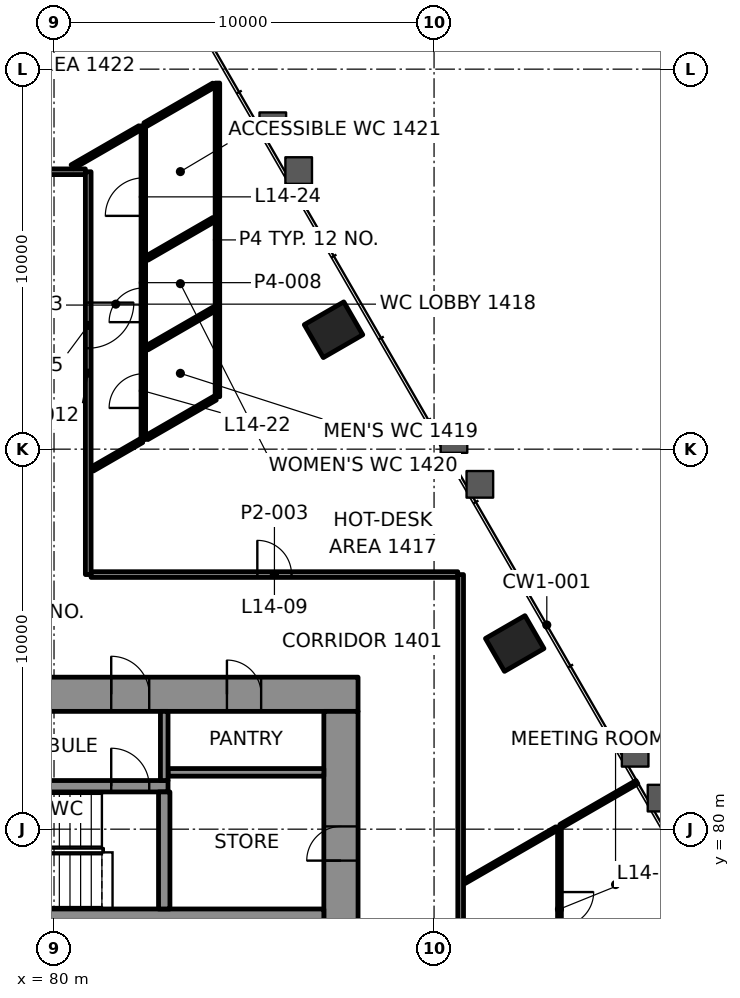
"""IFC4 building model, lengths in metres.
Left out: names, types, materials, properties, quantities, classifications, styles, units other than length and angle.
Written with IfcOpenShell. Run it as: python <this file> out.ifc"""

import sys

from ifc_helpers import new_model, si_unit, direction, frame, frame_2d, origin, origin_2d, place, context, subcontext, project, spatial, rectangle, extrude, element, fill, save


model = new_model("IFC4")
c1 = context("Model", 3, precision=1e-05, world=origin(), true_north=direction((0.0, 1.0)))
c2 = subcontext(c1, "Body", "Model", "MODEL_VIEW")
j1 = project(units=[si_unit("LENGTHUNIT", "METRE"), si_unit("PLANEANGLEUNIT", "RADIAN")], contexts=[c1])
p1 = place(None, origin())
s1 = spatial("IfcSite", under=j1, at=p1, CompositionType="ELEMENT")
p2 = place(p1, origin())
s2 = spatial("IfcBuilding", under=s1, at=p2, CompositionType="ELEMENT")
p3 = place(p2, frame((0.0, 0.0, 65.2)))
s3 = spatial("IfcBuildingStorey", under=s2, at=p3, CompositionType="ELEMENT", Elevation=65.2)
for number, where, z_axis, x_axis in (
    (1, (92.122, 84.885, -0.0), (0.0, 0.0, 1.0), (-0.5, 0.866, 0.0)),
    (2, (87.355, 93.143, -0.0), (0.0, 0.0, 1.0), (-0.5, 0.866, 0.0)),
):
    element("IfcColumn", number, at=place(p3, frame(where, z_axis=z_axis, x_axis=x_axis)), inside=s3, PredefinedType="COLUMN", context=c2, shape_type="SweptSolid", body=[
        extrude(rectangle(XDim=1.0, YDim=1.2, at=origin_2d()), origin(), (0.0, 0.0, 1.0), 4.2),
    ])
p4 = place(p3, frame((62.0, 83.55, 0.0), z_axis=(0.0, 0.0, 1.0), x_axis=(1.0, 0.0, 0.0)))
e3 = element("IfcWall", 3, at=p4, inside=s3, PredefinedType="SHEAR", context=c2, shape_type="SweptSolid", body=[
    extrude(rectangle(XDim=26.0, YDim=0.9, at=frame_2d((13.0, 0.0))), origin(), (0.0, 0.0, 1.0), 4.0),
])
p5 = place(p4, frame((5.695, 0.0, 0.0)))
e4 = element("IfcOpeningElement", 4, at=p5, cuts=e3, PredefinedType="OPENING", context=c2, shape_type="SweptSolid", body=[
    extrude(rectangle(XDim=1.0, YDim=2.1, at=frame_2d((0.5, 1.05))), frame((0.0, 0.46, 0.0), z_axis=(0.0, -1.0, 0.0), x_axis=(1.0, 0.0, 0.0)), (0.0, 0.0, 1.0), 0.92),
])
p6 = place(p4, frame((19.505, 0.0, 0.0)))
e5 = element("IfcOpeningElement", 5, at=p6, cuts=e3, PredefinedType="OPENING", context=c2, shape_type="SweptSolid", body=[
    extrude(rectangle(XDim=1.0, YDim=2.1, at=frame_2d((0.5, 1.05))), frame((0.0, 0.46, 0.0), z_axis=(0.0, -1.0, 0.0), x_axis=(1.0, 0.0, 0.0)), (0.0, 0.0, 1.0), 0.92),
])
p7 = place(p4, frame((3.45, 0.0, 0.0)))
e6 = element("IfcOpeningElement", 6, at=p7, cuts=e3, PredefinedType="OPENING", context=c2, shape_type="SweptSolid", body=[
    extrude(rectangle(XDim=0.9, YDim=2.1, at=frame_2d((0.45, 1.05))), frame((0.0, 0.46, 0.0), z_axis=(0.0, -1.0, 0.0), x_axis=(1.0, 0.0, 0.0)), (0.0, 0.0, 1.0), 0.92),
])
p8 = place(p4, frame((12.65, 0.0, 0.0)))
e7 = element("IfcOpeningElement", 7, at=p8, cuts=e3, PredefinedType="OPENING", context=c2, shape_type="SweptSolid", body=[
    extrude(rectangle(XDim=0.9, YDim=2.1, at=frame_2d((0.45, 1.05))), frame((0.0, 0.46, 0.0), z_axis=(0.0, -1.0, 0.0), x_axis=(1.0, 0.0, 0.0)), (0.0, 0.0, 1.0), 0.92),
])
p9 = place(p4, frame((22.55, 0.0, 0.0)))
e8 = element("IfcOpeningElement", 8, at=p9, cuts=e3, PredefinedType="OPENING", context=c2, shape_type="SweptSolid", body=[
    extrude(rectangle(XDim=0.9, YDim=2.1, at=frame_2d((0.45, 1.05))), frame((0.0, 0.46, 0.0), z_axis=(0.0, -1.0, 0.0), x_axis=(1.0, 0.0, 0.0)), (0.0, 0.0, 1.0), 0.92),
])
p10 = place(p3, frame((87.55, 66.9, 0.0), z_axis=(0.0, 0.0, 1.0), x_axis=(0.0, 1.0, 0.0)))
e9 = element("IfcWall", 9, at=p10, inside=s3, PredefinedType="SHEAR", context=c2, shape_type="SweptSolid", body=[
    extrude(rectangle(XDim=16.2, YDim=0.9, at=frame_2d((8.1, 0.0))), origin(), (0.0, 0.0, 1.0), 4.0),
])
p11 = place(p10, frame((5.5, 0.0, 0.0)))
e10 = element("IfcOpeningElement", 10, at=p11, cuts=e9, PredefinedType="OPENING", context=c2, shape_type="SweptSolid", body=[
    extrude(rectangle(XDim=1.8, YDim=2.1, at=frame_2d((0.9, 1.05))), frame((0.0, 0.46, 0.0), z_axis=(0.0, -1.0, 0.0), x_axis=(1.0, 0.0, 0.0)), (0.0, 0.0, 1.0), 0.92),
])
p12 = place(p10, frame((12.272, 0.0, 0.0)))
e11 = element("IfcOpeningElement", 11, at=p12, cuts=e9, PredefinedType="OPENING", context=c2, shape_type="SweptSolid", body=[
    extrude(rectangle(XDim=0.9, YDim=2.1, at=frame_2d((0.45, 1.05))), frame((0.0, 0.46, 0.0), z_axis=(0.0, -1.0, 0.0), x_axis=(1.0, 0.0, 0.0)), (0.0, 0.0, 1.0), 0.92),
])
p13 = place(p3, frame((64.35, 77.75, 0.0), z_axis=(0.0, 0.0, 1.0), x_axis=(1.0, 0.0, 0.0)))
e12 = element("IfcWall", 12, at=p13, inside=s3, PredefinedType="SHEAR", context=c2, shape_type="SweptSolid", body=[
    extrude(rectangle(XDim=22.75, YDim=0.3, at=frame_2d((11.375, 0.0))), origin(), (0.0, 0.0, 1.0), 4.0),
])
p14 = place(p13, frame((3.345, 0.0, 0.0)))
e13 = element("IfcOpeningElement", 13, at=p14, cuts=e12, PredefinedType="OPENING", context=c2, shape_type="SweptSolid", body=[
    extrude(rectangle(XDim=1.0, YDim=2.1, at=frame_2d((0.5, 1.05))), frame((0.0, 0.16, 0.0), z_axis=(0.0, -1.0, 0.0), x_axis=(1.0, 0.0, 0.0)), (0.0, 0.0, 1.0), 0.32),
])
p15 = place(p3, frame((76.14, 81.13, 0.0), z_axis=(0.0, 0.0, 1.0), x_axis=(1.0, 0.0, 0.0)))
e14 = element("IfcWall", 14, at=p15, inside=s3, PredefinedType="SHEAR", context=c2, shape_type="SweptSolid", body=[
    extrude(rectangle(XDim=6.86, YDim=0.3, at=frame_2d((3.43, 0.0))), origin(), (0.0, 0.0, 1.0), 4.0),
])
p16 = place(p15, frame((5.365, 0.0, 0.0)))
e15 = element("IfcOpeningElement", 15, at=p16, cuts=e14, PredefinedType="OPENING", context=c2, shape_type="SweptSolid", body=[
    extrude(rectangle(XDim=1.0, YDim=2.1, at=frame_2d((0.5, 1.05))), frame((0.0, 0.16, 0.0), z_axis=(0.0, -1.0, 0.0), x_axis=(1.0, 0.0, 0.0)), (0.0, 0.0, 1.0), 0.32),
])
p17 = place(p3, frame((82.9, 77.9, 0.0), z_axis=(0.0, 0.0, 1.0), x_axis=(0.0, 1.0, 0.0)))
e16 = element("IfcWall", 16, at=p17, inside=s3, PredefinedType="SHEAR", context=c2, shape_type="SweptSolid", body=[
    extrude(rectangle(XDim=3.08, YDim=0.3, at=frame_2d((1.54, 0.0))), origin(), (0.0, 0.0, 1.0), 4.0),
])
p18 = place(p3, frame((80.975, 86.7, 0.0), z_axis=(0.0, 0.0, 1.0), x_axis=(1.0, 0.0, 0.0)))
e17 = element("IfcWall", 17, at=p18, inside=s3, PredefinedType="PARTITIONING", context=c2, shape_type="SweptSolid", body=[
    extrude(rectangle(XDim=9.649, YDim=0.15, at=frame_2d((4.825, 0.0))), origin(), (0.0, 0.0, 1.0), 3.4),
])
p19 = place(p18, frame((4.375, 0.0, 0.0)))
e18 = element("IfcOpeningElement", 18, at=p19, cuts=e17, PredefinedType="OPENING", context=c2, shape_type="SweptSolid", body=[
    extrude(rectangle(XDim=0.9, YDim=2.1, at=frame_2d((0.45, 1.05))), frame((0.0, 0.085, 0.0), z_axis=(0.0, -1.0, 0.0), x_axis=(1.0, 0.0, 0.0)), (0.0, 0.0, 1.0), 0.17),
])
p20 = place(p3, frame((75.975, 97.3, 0.0), z_axis=(0.0, 0.0, 1.0), x_axis=(1.0, 0.0, 0.0)))
e19 = element("IfcWall", 19, at=p20, inside=s3, PredefinedType="PARTITIONING", context=c2, shape_type="SweptSolid", body=[
    extrude(rectangle(XDim=4.85, YDim=0.15, at=frame_2d((2.425, 0.0))), origin(), (0.0, 0.0, 1.0), 3.4),
])
p21 = place(p20, frame((1.792, 0.0, 0.0)))
e20 = element("IfcOpeningElement", 20, at=p21, cuts=e19, PredefinedType="OPENING", context=c2, shape_type="SweptSolid", body=[
    extrude(rectangle(XDim=0.9, YDim=2.1, at=frame_2d((0.45, 1.05))), frame((0.0, 0.085, 0.0), z_axis=(0.0, -1.0, 0.0), x_axis=(1.0, 0.0, 0.0)), (0.0, 0.0, 1.0), 0.17),
])
p22 = place(p3, frame((93.376, 75.976, 0.0), z_axis=(0.0, 0.0, 1.0), x_axis=(0.866006192811, 0.500033272906, 0.0)))
e21 = element("IfcWall", 21, at=p22, inside=s3, PredefinedType="PARTITIONING", context=c2, shape_type="SweptSolid", body=[
    extrude(rectangle(XDim=4.329, YDim=0.1, at=frame_2d((2.165, 0.0))), origin(), (0.0, 0.0, 1.0), 3.165),
])
p23 = place(p3, frame((90.801, 78.618, 0.0), z_axis=(0.0, 0.0, 1.0), x_axis=(0.866028733576, 0.499994232587, 0.0)))
e22 = element("IfcWall", 22, at=p23, inside=s3, PredefinedType="PARTITIONING", context=c2, shape_type="SweptSolid", body=[
    extrude(rectangle(XDim=2.799, YDim=0.1, at=frame_2d((1.4, 0.0))), origin(), (0.0, 0.0, 1.0), 3.4),
])
p24 = place(p3, frame((81.01, 89.479, 0.0), z_axis=(0.0, 0.0, 1.0), x_axis=(0.866055123991, 0.49994851956, 0.0)))
e23 = element("IfcWall", 23, at=p24, inside=s3, PredefinedType="PARTITIONING", context=c2, shape_type="SweptSolid", body=[
    extrude(rectangle(XDim=1.496, YDim=0.12, at=frame_2d((0.748, 0.0))), origin(), (0.0, 0.0, 1.0), 3.4),
])
for number, where, z_axis, x_axis in (
    (24, (82.445, 92.666, 0.0), (0.0, 0.0, 1.0), (0.866, 0.5, 0.0)),
    (25, (82.444, 95.026, 0.0), (0.0, 0.0, 1.0), (0.866, 0.5, 0.0)),
):
    element("IfcWall", number, at=place(p3, frame(where, z_axis=z_axis, x_axis=x_axis)), inside=s3, PredefinedType="PARTITIONING", context=c2, shape_type="SweptSolid", body=[
        extrude(rectangle(XDim=2.033, YDim=0.12, at=frame_2d((1.017, 0.0))), origin(), (0.0, 0.0, 1.0), 3.4),
    ])
p25 = place(p3, frame((80.479, 97.43, 0.0), z_axis=(0.0, 0.0, 1.0), x_axis=(0.866057052383, 0.499945179012, 0.0)))
e26 = element("IfcWall", 26, at=p25, inside=s3, PredefinedType="PARTITIONING", context=c2, shape_type="SweptSolid", body=[
    extrude(rectangle(XDim=2.056, YDim=0.12, at=frame_2d((1.028, 0.0))), origin(), (0.0, 0.0, 1.0), 3.4),
])
p26 = place(p3, frame((93.3, 80.061, 0.0), z_axis=(0.0, 0.0, 1.0), x_axis=(0.0, -1.0, 0.0)))
e27 = element("IfcWall", 27, at=p26, inside=s3, PredefinedType="PARTITIONING", context=c2, shape_type="SweptSolid", body=[
    extrude(rectangle(XDim=11.527, YDim=0.1, at=frame_2d((5.764, 0.0))), origin(), (0.0, 0.0, 1.0), 3.4),
])
p27 = place(p26, frame((1.716, 0.0, 0.0)))
e28 = element("IfcOpeningElement", 28, at=p27, cuts=e27, PredefinedType="OPENING", context=c2, shape_type="SweptSolid", body=[
    extrude(rectangle(XDim=0.9, YDim=2.1, at=frame_2d((0.45, 1.05))), frame((0.0, 0.06, 0.0), z_axis=(0.0, -1.0, 0.0), x_axis=(1.0, 0.0, 0.0)), (0.0, 0.0, 1.0), 0.12),
])
p28 = place(p26, frame((5.741, 0.0, 0.0)))
e29 = element("IfcOpeningElement", 29, at=p28, cuts=e27, PredefinedType="OPENING", context=c2, shape_type="SweptSolid", body=[
    extrude(rectangle(XDim=0.9, YDim=2.1, at=frame_2d((0.45, 1.05))), frame((0.0, 0.06, 0.0), z_axis=(0.0, -1.0, 0.0), x_axis=(1.0, 0.0, 0.0)), (0.0, 0.0, 1.0), 0.12),
])
p29 = place(p26, frame((9.342, 0.0, 0.0)))
e30 = element("IfcOpeningElement", 30, at=p29, cuts=e27, PredefinedType="OPENING", context=c2, shape_type="SweptSolid", body=[
    extrude(rectangle(XDim=0.9, YDim=2.1, at=frame_2d((0.45, 1.05))), frame((0.0, 0.06, 0.0), z_axis=(0.0, -1.0, 0.0), x_axis=(1.0, 0.0, 0.0)), (0.0, 0.0, 1.0), 0.12),
])
p30 = place(p3, frame((90.7, 86.699, 0.0), z_axis=(0.0, 0.0, 1.0), x_axis=(0.0, -1.0, 0.0)))
e31 = element("IfcWall", 31, at=p30, inside=s3, PredefinedType="PARTITIONING", context=c2, shape_type="SweptSolid", body=[
    extrude(rectangle(XDim=19.725, YDim=0.15, at=frame_2d((9.862, 0.0))), origin(), (0.0, 0.0, 1.0), 3.4),
])
p31 = place(p30, frame((11.768, 0.0, 0.0)))
e32 = element("IfcOpeningElement", 32, at=p31, cuts=e31, PredefinedType="OPENING", context=c2, shape_type="SweptSolid", body=[
    extrude(rectangle(XDim=1.0, YDim=2.1, at=frame_2d((0.5, 1.05))), frame((0.0, 0.085, 0.0), z_axis=(0.0, -1.0, 0.0), x_axis=(1.0, 0.0, 0.0)), (0.0, 0.0, 1.0), 0.17),
])
p32 = place(p30, frame((17.459, 0.0, 0.0)))
e33 = element("IfcOpeningElement", 33, at=p32, cuts=e31, PredefinedType="OPENING", context=c2, shape_type="SweptSolid", body=[
    extrude(rectangle(XDim=1.0, YDim=2.1, at=frame_2d((0.5, 1.05))), frame((0.0, 0.085, 0.0), z_axis=(0.0, -1.0, 0.0), x_axis=(1.0, 0.0, 0.0)), (0.0, 0.0, 1.0), 0.17),
])
p33 = place(p3, frame((84.3, 91.379, 0.0), z_axis=(0.0, 0.0, 1.0), x_axis=(0.0, 1.0, 0.0)))
e34 = element("IfcWall", 34, at=p33, inside=s3, PredefinedType="PARTITIONING", context=c2, shape_type="SweptSolid", body=[
    extrude(rectangle(XDim=8.255, YDim=0.12, at=frame_2d((4.127, 0.0))), origin(), (0.0, 0.0, 1.0), 3.165),
])
p34 = place(p3, frame((82.35, 90.253, 0.0), z_axis=(0.0, 0.0, 1.0), x_axis=(0.0, 1.0, 0.0)))
e35 = element("IfcWall", 35, at=p34, inside=s3, PredefinedType="PARTITIONING", context=c2, shape_type="SweptSolid", body=[
    extrude(rectangle(XDim=8.257, YDim=0.12, at=frame_2d((4.128, 0.0))), origin(), (0.0, 0.0, 1.0), 3.4),
])
p35 = place(p34, frame((0.831, 0.0, 0.0)))
e36 = element("IfcOpeningElement", 36, at=p35, cuts=e35, PredefinedType="OPENING", context=c2, shape_type="SweptSolid", body=[
    extrude(rectangle(XDim=0.9, YDim=2.1, at=frame_2d((0.45, 1.05))), frame((0.0, 0.07, 0.0), z_axis=(0.0, -1.0, 0.0), x_axis=(1.0, 0.0, 0.0)), (0.0, 0.0, 1.0), 0.14),
])
p36 = place(p34, frame((3.089, 0.0, 0.0)))
e37 = element("IfcOpeningElement", 37, at=p36, cuts=e35, PredefinedType="OPENING", context=c2, shape_type="SweptSolid", body=[
    extrude(rectangle(XDim=0.9, YDim=2.1, at=frame_2d((0.45, 1.05))), frame((0.0, 0.07, 0.0), z_axis=(0.0, -1.0, 0.0), x_axis=(1.0, 0.0, 0.0)), (0.0, 0.0, 1.0), 0.14),
])
p37 = place(p34, frame((5.886, 0.0, 0.0)))
e38 = element("IfcOpeningElement", 38, at=p37, cuts=e35, PredefinedType="OPENING", context=c2, shape_type="SweptSolid", body=[
    extrude(rectangle(XDim=1.0, YDim=2.1, at=frame_2d((0.5, 1.05))), frame((0.0, 0.07, 0.0), z_axis=(0.0, -1.0, 0.0), x_axis=(1.0, 0.0, 0.0)), (0.0, 0.0, 1.0), 0.14),
])
p38 = place(p3, frame((80.9, 97.3, 0.0), z_axis=(0.0, 0.0, 1.0), x_axis=(0.0, -1.0, 0.0)))
e39 = element("IfcWall", 39, at=p38, inside=s3, PredefinedType="PARTITIONING", context=c2, shape_type="SweptSolid", body=[
    extrude(rectangle(XDim=10.6, YDim=0.15, at=frame_2d((5.3, 0.0))), origin(), (0.0, 0.0, 1.0), 3.4),
])
p39 = place(p38, frame((3.444, 0.0, 0.0)))
e40 = element("IfcOpeningElement", 40, at=p39, cuts=e39, PredefinedType="OPENING", context=c2, shape_type="SweptSolid", body=[
    extrude(rectangle(XDim=1.2, YDim=2.1, at=frame_2d((0.6, 1.05))), frame((0.0, 0.085, 0.0), z_axis=(0.0, -1.0, 0.0), x_axis=(1.0, 0.0, 0.0)), (0.0, 0.0, 1.0), 0.17),
])
p40 = place(p3, frame((93.337, 80.083, 0.0), z_axis=(0.0, 0.0, 1.0), x_axis=(0.866028885721, 0.49999396906, 0.0)))
e41 = element("IfcWall", 41, at=p40, inside=s3, PredefinedType="PARTITIONING", context=c2, shape_type="SweptSolid", body=[
    extrude(rectangle(XDim=2.309, YDim=0.1, at=frame_2d((1.155, 0.0))), origin(), (0.0, 0.0, 1.0), 3.165),
])
p41 = place(p3, frame((82.44, 90.304, 0.0), z_axis=(0.0, 0.0, 1.0), x_axis=(0.866044773228, 0.499966449638, 0.0)))
e42 = element("IfcWall", 42, at=p41, inside=s3, PredefinedType="PARTITIONING", context=c2, shape_type="SweptSolid", body=[
    extrude(rectangle(XDim=2.079, YDim=0.12, at=frame_2d((1.04, 0.0))), origin(), (0.0, 0.0, 1.0), 3.4),
])
p42 = place(p3, frame((82.395, 98.536, 0.0), z_axis=(0.0, 0.0, 1.0), x_axis=(0.866041603473, 0.499971940267, 0.0)))
e43 = element("IfcWall", 43, at=p42, inside=s3, PredefinedType="PARTITIONING", context=c2, shape_type="SweptSolid", body=[
    extrude(rectangle(XDim=2.089, YDim=0.12, at=frame_2d((1.045, 0.0))), origin(), (0.0, 0.0, 1.0), 3.165),
])
p43 = place(p3, frame((83.0, 81.495, 0.0), z_axis=(0.0, 0.0, 1.0), x_axis=(1.0, 0.0, 0.0)))
e44 = element("IfcWall", 44, at=p43, inside=s3, PredefinedType="PARTITIONING", context=c2, shape_type="SweptSolid", body=[
    extrude(rectangle(XDim=4.1, YDim=0.2, at=frame_2d((2.05, 0.0))), origin(), (0.0, 0.0, 1.0), 4.0),
])
p44 = place(p3, frame((82.9, 81.28, 0.0), z_axis=(0.0, 0.0, 1.0), x_axis=(0.0, 1.0, 0.0)))
e45 = element("IfcWall", 45, at=p44, inside=s3, PredefinedType="PARTITIONING", context=c2, shape_type="SweptSolid", body=[
    extrude(rectangle(XDim=1.82, YDim=0.2, at=frame_2d((0.91, 0.0))), origin(), (0.0, 0.0, 1.0), 4.0),
])
p45 = place(p19, origin())
e46 = element("IfcDoor", 46, at=p45, inside=s3, OperationType="SINGLE_SWING_RIGHT", PredefinedType="DOOR", context=c2, shape_type="SweptSolid", body=[
    extrude(rectangle(XDim=0.9, YDim=2.1, at=frame_2d((0.45, 1.05))), frame((0.0, 0.025, 0.0), z_axis=(0.0, -1.0, 0.0), x_axis=(1.0, 0.0, 0.0)), (0.0, 0.0, 1.0), 0.05),
])
fill(e18, e46)
p46 = place(p27, origin())
e47 = element("IfcDoor", 47, at=p46, inside=s3, OperationType="SINGLE_SWING_RIGHT", PredefinedType="DOOR", context=c2, shape_type="SweptSolid", body=[
    extrude(rectangle(XDim=0.9, YDim=2.1, at=frame_2d((0.45, 1.05))), frame((0.0, 0.025, 0.0), z_axis=(0.0, -1.0, 0.0), x_axis=(1.0, 0.0, 0.0)), (0.0, 0.0, 1.0), 0.05),
])
fill(e28, e47)
p47 = place(p35, origin())
e48 = element("IfcDoor", 48, at=p47, inside=s3, OperationType="SINGLE_SWING_RIGHT", PredefinedType="DOOR", context=c2, shape_type="SweptSolid", body=[
    extrude(rectangle(XDim=0.9, YDim=2.1, at=frame_2d((0.45, 1.05))), frame((0.0, 0.025, 0.0), z_axis=(0.0, -1.0, 0.0), x_axis=(1.0, 0.0, 0.0)), (0.0, 0.0, 1.0), 0.05),
])
fill(e36, e48)
p48 = place(p36, origin())
e49 = element("IfcDoor", 49, at=p48, inside=s3, OperationType="SINGLE_SWING_LEFT", PredefinedType="DOOR", context=c2, shape_type="SweptSolid", body=[
    extrude(rectangle(XDim=0.9, YDim=2.1, at=frame_2d((0.45, 1.05))), frame((0.0, 0.025, 0.0), z_axis=(0.0, -1.0, 0.0), x_axis=(1.0, 0.0, 0.0)), (0.0, 0.0, 1.0), 0.05),
])
fill(e37, e49)
p49 = place(p37, origin())
e50 = element("IfcDoor", 50, at=p49, inside=s3, OperationType="SINGLE_SWING_RIGHT", PredefinedType="DOOR", context=c2, shape_type="SweptSolid", body=[
    extrude(rectangle(XDim=1.0, YDim=2.1, at=frame_2d((0.5, 1.05))), frame((0.0, 0.025, 0.0), z_axis=(0.0, -1.0, 0.0), x_axis=(1.0, 0.0, 0.0)), (0.0, 0.0, 1.0), 0.05),
])
fill(e38, e50)
p50 = place(p39, origin())
e51 = element("IfcDoor", 51, at=p50, inside=s3, OperationType="DOUBLE_DOOR_SINGLE_SWING", PredefinedType="DOOR", context=c2, shape_type="SweptSolid", body=[
    extrude(rectangle(XDim=1.2, YDim=2.1, at=frame_2d((0.6, 1.05))), frame((0.0, 0.025, 0.0), z_axis=(0.0, -1.0, 0.0), x_axis=(1.0, 0.0, 0.0)), (0.0, 0.0, 1.0), 0.05),
])
fill(e40, e51)
p51 = place(p16, origin())
e52 = element("IfcDoor", 52, at=p51, inside=s3, OperationType="SINGLE_SWING_RIGHT", PredefinedType="DOOR", context=c2, shape_type="SweptSolid", body=[
    extrude(rectangle(XDim=1.0, YDim=2.1, at=frame_2d((0.5, 1.05))), frame((0.0, 0.025, 0.0), z_axis=(0.0, -1.0, 0.0), x_axis=(1.0, 0.0, 0.0)), (0.0, 0.0, 1.0), 0.05),
])
fill(e15, e52)
p52 = place(p6, origin())
e53 = element("IfcDoor", 53, at=p52, inside=s3, OperationType="SINGLE_SWING_LEFT", PredefinedType="DOOR", context=c2, shape_type="SweptSolid", body=[
    extrude(rectangle(XDim=1.0, YDim=2.1, at=frame_2d((0.5, 1.05))), frame((0.0, 0.17, 0.0), z_axis=(0.0, -1.0, 0.0), x_axis=(1.0, 0.0, 0.0)), (0.0, 0.0, 1.0), 0.34),
])
fill(e5, e53)
p53 = place(p12, origin())
e54 = element("IfcDoor", 54, at=p53, inside=s3, OperationType="SINGLE_SWING_RIGHT", PredefinedType="DOOR", context=c2, shape_type="SweptSolid", body=[
    extrude(rectangle(XDim=0.9, YDim=2.1, at=frame_2d((0.45, 1.05))), frame((0.0, 0.17, 0.0), z_axis=(0.0, -1.0, 0.0), x_axis=(1.0, 0.0, 0.0)), (0.0, 0.0, 1.0), 0.34),
])
fill(e11, e54)
p54 = place(p9, origin())
e55 = element("IfcDoor", 55, at=p54, inside=s3, OperationType="SINGLE_SWING_LEFT", PredefinedType="DOOR", context=c2, shape_type="SweptSolid", body=[
    extrude(rectangle(XDim=0.9, YDim=2.1, at=frame_2d((0.45, 1.05))), frame((0.0, 0.17, 0.0), z_axis=(0.0, -1.0, 0.0), x_axis=(1.0, 0.0, 0.0)), (0.0, 0.0, 1.0), 0.34),
])
fill(e8, e55)
save(model, sys.argv[1])
